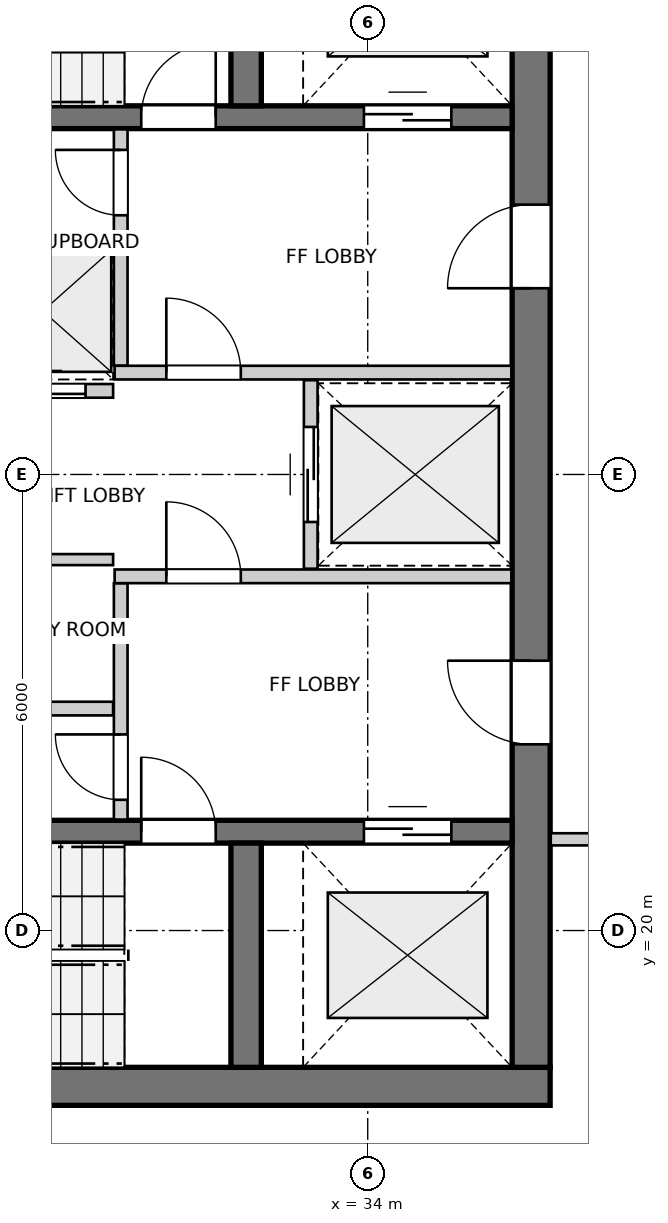
"""IFC4 building model, lengths in metres.
Left out: names, types, materials, properties, quantities, classifications, styles, units other than length and angle.
Written with IfcOpenShell. Run it as: python <this file> out.ifc"""

import sys

from ifc_helpers import new_model, si_unit, direction, frame, frame_2d, origin, place, context, subcontext, project, spatial, rectangle, extrude, source, transform, mapped, element, fill, save


model = new_model("IFC4")
c1 = context("Model", 3, precision=1e-05, world=origin(), true_north=direction((0.0, 1.0)))
c2 = subcontext(c1, "Body", "Model", "MODEL_VIEW")
j1 = project(units=[si_unit("LENGTHUNIT", "METRE"), si_unit("PLANEANGLEUNIT", "RADIAN")], contexts=[c1])
p1 = place(None, origin())
s1 = spatial("IfcSite", under=j1, at=p1, CompositionType="ELEMENT")
p2 = place(p1, origin())
s2 = spatial("IfcBuilding", under=s1, at=p2, CompositionType="ELEMENT")
p3 = place(p2, frame((0.0, 0.0, 234.0)))
s3 = spatial("IfcBuildingStorey", under=s2, at=p3, CompositionType="ELEMENT", Elevation=234.0)
p4 = place(p3, frame((24.3, 17.95, 0.0), z_axis=(0.0, 0.0, 1.0), x_axis=(1.0, 0.0, 0.0)))
e1 = element("IfcWall", 1, at=p4, inside=s3, PredefinedType="SHEAR", context=c2, shape_type="SweptSolid", body=[
    extrude(rectangle(XDim=12.1, YDim=0.5, at=frame_2d((6.05, 0.0))), origin(), (0.0, 0.0, 1.0), 2.96),
])
p5 = place(p3, frame((36.15, 18.2, 0.0), z_axis=(0.0, 0.0, 1.0), x_axis=(0.0, 1.0, 0.0)))
e2 = element("IfcWall", 2, at=p5, inside=s3, PredefinedType="SHEAR", context=c2, shape_type="SweptSolid", body=[
    extrude(rectangle(XDim=15.6, YDim=0.5, at=frame_2d((7.8, 0.0))), origin(), (0.0, 0.0, 1.0), 2.96),
])
p6 = place(p5, frame((4.25, 0.0, 0.0)))
e3 = element("IfcOpeningElement", 3, at=p6, cuts=e2, PredefinedType="OPENING", context=c2, shape_type="SweptSolid", body=[
    extrude(rectangle(XDim=1.1, YDim=2.15, at=frame_2d((0.55, 1.075))), frame((0.0, 0.26, 0.0), z_axis=(0.0, -1.0, 0.0), x_axis=(1.0, 0.0, 0.0)), (0.0, 0.0, 1.0), 0.52),
])
p7 = place(p5, frame((10.25, 0.0, 0.0)))
e4 = element("IfcOpeningElement", 4, at=p7, cuts=e2, PredefinedType="OPENING", context=c2, shape_type="SweptSolid", body=[
    extrude(rectangle(XDim=1.1, YDim=2.15, at=frame_2d((0.55, 1.075))), frame((0.0, 0.26, 0.0), z_axis=(0.0, -1.0, 0.0), x_axis=(1.0, 0.0, 0.0)), (0.0, 0.0, 1.0), 0.52),
])
p8 = place(p3, frame((24.8, 21.3, 0.0), z_axis=(0.0, 0.0, 1.0), x_axis=(1.0, 0.0, 0.0)))
e5 = element("IfcWall", 5, at=p8, inside=s3, PredefinedType="SHEAR", context=c2, shape_type="SweptSolid", body=[
    extrude(rectangle(XDim=11.1, YDim=0.3, at=frame_2d((5.55, 0.0))), origin(), (0.0, 0.0, 1.0), 2.96),
])
p9 = place(p8, frame((6.22, 0.0, 0.0)))
e6 = element("IfcOpeningElement", 6, at=p9, cuts=e5, PredefinedType="OPENING", context=c2, shape_type="SweptSolid", body=[
    extrude(rectangle(XDim=0.98, YDim=2.15, at=frame_2d((0.49, 1.075))), frame((0.0, 0.16, 0.0), z_axis=(0.0, -1.0, 0.0), x_axis=(1.0, 0.0, 0.0)), (0.0, 0.0, 1.0), 0.32),
])
p10 = place(p8, frame((9.15, 0.0, 0.0)))
e7 = element("IfcOpeningElement", 7, at=p10, cuts=e5, PredefinedType="OPENING", context=c2, shape_type="SweptSolid", body=[
    extrude(rectangle(XDim=1.15, YDim=2.15, at=frame_2d((0.575, 1.075))), frame((0.0, 0.16, 0.0), z_axis=(0.0, -1.0, 0.0), x_axis=(1.0, 0.0, 0.0)), (0.0, 0.0, 1.0), 0.32),
])
p11 = place(p3, frame((32.4, 18.2, 0.0), z_axis=(0.0, 0.0, 1.0), x_axis=(0.0, 1.0, 0.0)))
e8 = element("IfcWall", 8, at=p11, inside=s3, PredefinedType="SHEAR", context=c2, shape_type="SweptSolid", body=[
    extrude(rectangle(XDim=2.95, YDim=0.4, at=frame_2d((1.475, 0.0))), origin(), (0.0, 0.0, 1.0), 2.96),
])
p12 = place(p3, frame((24.8, 30.7, 0.0), z_axis=(0.0, 0.0, 1.0), x_axis=(1.0, 0.0, 0.0)))
e9 = element("IfcWall", 9, at=p12, inside=s3, PredefinedType="SHEAR", context=c2, shape_type="SweptSolid", body=[
    extrude(rectangle(XDim=11.1, YDim=0.3, at=frame_2d((5.55, 0.0))), origin(), (0.0, 0.0, 1.0), 2.96),
])
p13 = place(p12, frame((6.22, 0.0, 0.0)))
e10 = element("IfcOpeningElement", 10, at=p13, cuts=e9, PredefinedType="OPENING", context=c2, shape_type="SweptSolid", body=[
    extrude(rectangle(XDim=0.98, YDim=2.15, at=frame_2d((0.49, 1.075))), frame((0.0, 0.16, 0.0), z_axis=(0.0, -1.0, 0.0), x_axis=(1.0, 0.0, 0.0)), (0.0, 0.0, 1.0), 0.32),
])
p14 = place(p12, frame((9.15, 0.0, 0.0)))
e11 = element("IfcOpeningElement", 11, at=p14, cuts=e9, PredefinedType="OPENING", context=c2, shape_type="SweptSolid", body=[
    extrude(rectangle(XDim=1.15, YDim=2.15, at=frame_2d((0.575, 1.075))), frame((0.0, 0.16, 0.0), z_axis=(0.0, -1.0, 0.0), x_axis=(1.0, 0.0, 0.0)), (0.0, 0.0, 1.0), 0.32),
])
p15 = place(p3, frame((32.4, 30.85, 0.0), z_axis=(0.0, 0.0, 1.0), x_axis=(0.0, 1.0, 0.0)))
e12 = element("IfcWall", 12, at=p15, inside=s3, PredefinedType="SHEAR", context=c2, shape_type="SweptSolid", body=[
    extrude(rectangle(XDim=2.95, YDim=0.4, at=frame_2d((1.475, 0.0))), origin(), (0.0, 0.0, 1.0), 2.96),
])
p16 = place(p3, frame((30.75, 21.46, 0.0), z_axis=(0.0, 0.0, 1.0), x_axis=(0.0, 1.0, 0.0)))
e13 = element("IfcWall", 13, at=p16, inside=s3, PredefinedType="PARTITIONING", context=c2, shape_type="SweptSolid", body=[
    extrude(rectangle(XDim=3.11, YDim=0.18, at=frame_2d((1.555, 0.0))), origin(), (0.0, 0.0, 1.0), 2.96),
])
p17 = place(p16, frame((0.26, 0.0, 0.0)))
e14 = element("IfcOpeningElement", 14, at=p17, cuts=e13, PredefinedType="OPENING", context=c2, shape_type="SweptSolid", body=[
    extrude(rectangle(XDim=0.86, YDim=2.05, at=frame_2d((0.43, 1.025))), frame((0.0, 0.1, 0.0), z_axis=(0.0, -1.0, 0.0), x_axis=(1.0, 0.0, 0.0)), (0.0, 0.0, 1.0), 0.2),
])
p18 = place(p3, frame((30.67, 24.66, 0.0), z_axis=(0.0, 0.0, 1.0), x_axis=(1.0, 0.0, 0.0)))
e15 = element("IfcWall", 15, at=p18, inside=s3, PredefinedType="PARTITIONING", context=c2, shape_type="SweptSolid", body=[
    extrude(rectangle(XDim=5.22, YDim=0.18, at=frame_2d((2.61, 0.0))), origin(), (0.0, 0.0, 1.0), 2.96),
])
p19 = place(p18, frame((0.68, 0.0, 0.0)))
e16 = element("IfcOpeningElement", 16, at=p19, cuts=e15, PredefinedType="OPENING", context=c2, shape_type="SweptSolid", body=[
    extrude(rectangle(XDim=0.98, YDim=2.15, at=frame_2d((0.49, 1.075))), frame((0.0, 0.1, 0.0), z_axis=(0.0, -1.0, 0.0), x_axis=(1.0, 0.0, 0.0)), (0.0, 0.0, 1.0), 0.2),
])
p20 = place(p3, frame((30.75, 27.43, 0.0), z_axis=(0.0, 0.0, 1.0), x_axis=(0.0, 1.0, 0.0)))
e17 = element("IfcWall", 17, at=p20, inside=s3, PredefinedType="PARTITIONING", context=c2, shape_type="SweptSolid", body=[
    extrude(rectangle(XDim=3.11, YDim=0.18, at=frame_2d((1.555, 0.0))), origin(), (0.0, 0.0, 1.0), 2.96),
])
p21 = place(p20, frame((1.98, 0.0, 0.0)))
e18 = element("IfcOpeningElement", 18, at=p21, cuts=e17, PredefinedType="OPENING", context=c2, shape_type="SweptSolid", body=[
    extrude(rectangle(XDim=0.86, YDim=2.05, at=frame_2d((0.43, 1.025))), frame((0.0, 0.1, 0.0), z_axis=(0.0, -1.0, 0.0), x_axis=(1.0, 0.0, 0.0)), (0.0, 0.0, 1.0), 0.2),
])
p22 = place(p3, frame((30.67, 27.34, 0.0), z_axis=(0.0, 0.0, 1.0), x_axis=(1.0, 0.0, 0.0)))
e19 = element("IfcWall", 19, at=p22, inside=s3, PredefinedType="PARTITIONING", context=c2, shape_type="SweptSolid", body=[
    extrude(rectangle(XDim=5.22, YDim=0.18, at=frame_2d((2.61, 0.0))), origin(), (0.0, 0.0, 1.0), 2.96),
])
p23 = place(p22, frame((0.68, 0.0, 0.0)))
e20 = element("IfcOpeningElement", 20, at=p23, cuts=e19, PredefinedType="OPENING", context=c2, shape_type="SweptSolid", body=[
    extrude(rectangle(XDim=0.98, YDim=2.15, at=frame_2d((0.49, 1.075))), frame((0.0, 0.1, 0.0), z_axis=(0.0, -1.0, 0.0), x_axis=(1.0, 0.0, 0.0)), (0.0, 0.0, 1.0), 0.2),
])
p24 = place(p3, frame((33.25, 24.76, 0.0), z_axis=(0.0, 0.0, 1.0), x_axis=(0.0, 1.0, 0.0)))
e21 = element("IfcWall", 21, at=p24, inside=s3, PredefinedType="PARTITIONING", context=c2, shape_type="SweptSolid", body=[
    extrude(rectangle(XDim=2.48, YDim=0.18, at=frame_2d((1.24, 0.0))), origin(), (0.0, 0.0, 1.0), 2.96),
])
p25 = place(p24, frame((0.615, 0.0, 0.0)))
e22 = element("IfcOpeningElement", 22, at=p25, cuts=e21, PredefinedType="OPENING", context=c2, shape_type="SweptSolid", body=[
    extrude(rectangle(XDim=1.25, YDim=2.15, at=frame_2d((0.625, 1.075))), frame((0.0, 0.1, 0.0), z_axis=(0.0, -1.0, 0.0), x_axis=(1.0, 0.0, 0.0)), (0.0, 0.0, 1.0), 0.2),
])
p26 = place(p3, frame((24.81, 22.92, 0.0), z_axis=(0.0, 0.0, 1.0), x_axis=(1.0, 0.0, 0.0)))
e23 = element("IfcWall", 23, at=p26, inside=s3, PredefinedType="PARTITIONING", context=c2, shape_type="SweptSolid", body=[
    extrude(rectangle(XDim=5.84, YDim=0.18, at=frame_2d((2.92, 0.0))), origin(), (0.0, 0.0, 1.0), 2.96),
])
p27 = place(p3, frame((24.81, 24.88, 0.0), z_axis=(0.0, 0.0, 1.0), x_axis=(1.0, 0.0, 0.0)))
e24 = element("IfcWall", 24, at=p27, inside=s3, PredefinedType="PARTITIONING", context=c2, shape_type="SweptSolid", body=[
    extrude(rectangle(XDim=5.84, YDim=0.145, at=frame_2d((2.92, 0.0))), origin(), (0.0, 0.0, 1.0), 2.96),
])
p28 = place(p27, frame((2.4, 0.0, 0.0)))
e25 = element("IfcOpeningElement", 25, at=p28, cuts=e24, PredefinedType="OPENING", context=c2, shape_type="SweptSolid", body=[
    extrude(rectangle(XDim=0.96, YDim=2.1, at=frame_2d((0.48, 1.05))), frame((0.0, 0.083, 0.0), z_axis=(0.0, -1.0, 0.0), x_axis=(1.0, 0.0, 0.0)), (0.0, 0.0, 1.0), 0.165),
])
p29 = place(p3, frame((24.81, 29.08, 0.0), z_axis=(0.0, 0.0, 1.0), x_axis=(1.0, 0.0, 0.0)))
e26 = element("IfcWall", 26, at=p29, inside=s3, PredefinedType="PARTITIONING", context=c2, shape_type="SweptSolid", body=[
    extrude(rectangle(XDim=5.84, YDim=0.18, at=frame_2d((2.92, 0.0))), origin(), (0.0, 0.0, 1.0), 2.96),
])
p30 = place(p3, frame((28.825, 27.1, 0.0), z_axis=(0.0, 0.0, 1.0), x_axis=(1.0, 0.0, 0.0)))
e27 = element("IfcWall", 27, at=p30, inside=s3, PredefinedType="PARTITIONING", context=c2, shape_type="SweptSolid", body=[
    extrude(rectangle(XDim=1.825, YDim=0.18, at=frame_2d((0.913, 0.0))), origin(), (0.0, 0.0, 1.0), 2.96),
])
p31 = place(p30, frame((0.363, 0.0, 0.0)))
e28 = element("IfcOpeningElement", 28, at=p31, cuts=e27, PredefinedType="OPENING", context=c2, shape_type="SweptSolid", body=[
    extrude(rectangle(XDim=1.1, YDim=2.15, at=frame_2d((0.55, 1.075))), frame((0.0, 0.1, 0.0), z_axis=(0.0, -1.0, 0.0), x_axis=(1.0, 0.0, 0.0)), (0.0, 0.0, 1.0), 0.2),
])
p32 = place(p3, frame((36.408, 21.2, 0.0), z_axis=(0.0, 0.0, 1.0), x_axis=(1.0, 0.0, 0.0)))
e29 = element("IfcWall", 29, at=p32, inside=s3, PredefinedType="PARTITIONING", context=c2, shape_type="SweptSolid", body=[
    extrude(rectangle(XDim=1.061, YDim=0.16, at=frame_2d((0.531, 0.0))), origin(), (0.0, 0.0, 1.0), 2.96),
])
m1 = source(origin(), c2, "Body", "SweptSolid", [
    extrude(rectangle(XDim=0.98, YDim=2.15, at=frame_2d((0.49, 1.075))), frame((0.0, 0.025, 0.0), z_axis=(0.0, -1.0, 0.0), x_axis=(1.0, 0.0, 0.0)), (0.0, 0.0, 1.0), 0.05),
])
p33 = place(p9, origin())
e30 = element("IfcDoor", 30, at=p33, inside=s3, OperationType="SINGLE_SWING_LEFT", PredefinedType="DOOR", context=c2, shape_type="MappedRepresentation", body=[
    mapped(m1, transform((0.0, 0.0, 0.0), x_axis=(1.0, 0.0, 0.0), y_axis=(0.0, 1.0, 0.0), z_axis=(0.0, 0.0, 1.0), scale=1.0)),
])
fill(e6, e30)
m2 = source(origin(), c2, "Body", "SweptSolid", [
    extrude(rectangle(XDim=1.15, YDim=2.15, at=frame_2d((0.575, 1.075))), frame((0.0, 0.025, 0.0), z_axis=(0.0, -1.0, 0.0), x_axis=(1.0, 0.0, 0.0)), (0.0, 0.0, 1.0), 0.05),
])
p34 = place(p10, origin())
e31 = element("IfcDoor", 31, at=p34, inside=s3, OperationType="DOUBLE_DOOR_SLIDING", PredefinedType="DOOR", context=c2, shape_type="MappedRepresentation", body=[
    mapped(m2, transform((0.0, 0.0, 0.0), x_axis=(1.0, 0.0, 0.0), y_axis=(0.0, 1.0, 0.0), z_axis=(0.0, 0.0, 1.0), scale=1.0)),
])
fill(e7, e31)
p35 = place(p13, origin())
e32 = element("IfcDoor", 32, at=p35, inside=s3, OperationType="SINGLE_SWING_RIGHT", PredefinedType="DOOR", context=c2, shape_type="MappedRepresentation", body=[
    mapped(m1, transform((0.0, 0.0, 0.0), x_axis=(1.0, 0.0, 0.0), y_axis=(0.0, 1.0, 0.0), z_axis=(0.0, 0.0, 1.0), scale=1.0)),
])
fill(e10, e32)
p36 = place(p14, origin())
e33 = element("IfcDoor", 33, at=p36, inside=s3, OperationType="DOUBLE_DOOR_SLIDING", PredefinedType="DOOR", context=c2, shape_type="MappedRepresentation", body=[
    mapped(m2, transform((0.0, 0.0, 0.0), x_axis=(1.0, 0.0, 0.0), y_axis=(0.0, 1.0, 0.0), z_axis=(0.0, 0.0, 1.0), scale=1.0)),
])
fill(e11, e33)
m3 = source(origin(), c2, "Body", "SweptSolid", [
    extrude(rectangle(XDim=1.1, YDim=2.15, at=frame_2d((0.55, 1.075))), frame((0.0, 0.025, 0.0), z_axis=(0.0, -1.0, 0.0), x_axis=(1.0, 0.0, 0.0)), (0.0, 0.0, 1.0), 0.05),
])
p37 = place(p6, origin())
e34 = element("IfcDoor", 34, at=p37, inside=s3, OperationType="SINGLE_SWING_RIGHT", PredefinedType="DOOR", context=c2, shape_type="MappedRepresentation", body=[
    mapped(m3, transform((0.0, 0.0, 0.0), x_axis=(1.0, 0.0, 0.0), y_axis=(0.0, 1.0, 0.0), z_axis=(0.0, 0.0, 1.0), scale=1.0)),
])
fill(e3, e34)
p38 = place(p7, origin())
e35 = element("IfcDoor", 35, at=p38, inside=s3, OperationType="SINGLE_SWING_LEFT", PredefinedType="DOOR", context=c2, shape_type="MappedRepresentation", body=[
    mapped(m3, transform((0.0, 0.0, 0.0), x_axis=(1.0, 0.0, 0.0), y_axis=(0.0, 1.0, 0.0), z_axis=(0.0, 0.0, 1.0), scale=1.0)),
])
fill(e4, e35)
m4 = source(origin(), c2, "Body", "SweptSolid", [
    extrude(rectangle(XDim=0.86, YDim=2.05, at=frame_2d((0.43, 1.025))), frame((0.0, 0.025, 0.0), z_axis=(0.0, -1.0, 0.0), x_axis=(1.0, 0.0, 0.0)), (0.0, 0.0, 1.0), 0.05),
])
p39 = place(p17, origin())
e36 = element("IfcDoor", 36, at=p39, inside=s3, OperationType="SINGLE_SWING_RIGHT", PredefinedType="DOOR", context=c2, shape_type="MappedRepresentation", body=[
    mapped(m4, transform((0.0, 0.0, 0.0), x_axis=(1.0, 0.0, 0.0), y_axis=(0.0, 1.0, 0.0), z_axis=(0.0, 0.0, 1.0), scale=1.0)),
])
fill(e14, e36)
p40 = place(p19, origin())
e37 = element("IfcDoor", 37, at=p40, inside=s3, OperationType="SINGLE_SWING_LEFT", PredefinedType="DOOR", context=c2, shape_type="MappedRepresentation", body=[
    mapped(m1, transform((0.0, 0.0, 0.0), x_axis=(1.0, 0.0, 0.0), y_axis=(0.0, 1.0, 0.0), z_axis=(0.0, 0.0, 1.0), scale=1.0)),
])
fill(e16, e37)
p41 = place(p21, origin())
e38 = element("IfcDoor", 38, at=p41, inside=s3, OperationType="SINGLE_SWING_RIGHT", PredefinedType="DOOR", context=c2, shape_type="MappedRepresentation", body=[
    mapped(m4, transform((0.0, 0.0, 0.0), x_axis=(1.0, 0.0, 0.0), y_axis=(0.0, 1.0, 0.0), z_axis=(0.0, 0.0, 1.0), scale=1.0)),
])
fill(e18, e38)
p42 = place(p23, origin())
e39 = element("IfcDoor", 39, at=p42, inside=s3, OperationType="SINGLE_SWING_LEFT", PredefinedType="DOOR", context=c2, shape_type="MappedRepresentation", body=[
    mapped(m1, transform((0.0, 0.0, 0.0), x_axis=(1.0, 0.0, 0.0), y_axis=(0.0, 1.0, 0.0), z_axis=(0.0, 0.0, 1.0), scale=1.0)),
])
fill(e20, e39)
m5 = source(origin(), c2, "Body", "SweptSolid", [
    extrude(rectangle(XDim=1.25, YDim=2.15, at=frame_2d((0.625, 1.075))), frame((0.0, 0.025, 0.0), z_axis=(0.0, -1.0, 0.0), x_axis=(1.0, 0.0, 0.0)), (0.0, 0.0, 1.0), 0.05),
])
p43 = place(p25, origin())
e40 = element("IfcDoor", 40, at=p43, inside=s3, OperationType="DOUBLE_DOOR_SLIDING", PredefinedType="DOOR", context=c2, shape_type="MappedRepresentation", body=[
    mapped(m5, transform((0.0, 0.0, 0.0), x_axis=(1.0, 0.0, 0.0), y_axis=(0.0, 1.0, 0.0), z_axis=(0.0, 0.0, 1.0), scale=1.0)),
])
fill(e22, e40)
p44 = place(p31, origin())
e41 = element("IfcDoor", 41, at=p44, inside=s3, OperationType="DOUBLE_DOOR_SLIDING", PredefinedType="DOOR", context=c2, shape_type="MappedRepresentation", body=[
    mapped(m3, transform((0.0, 0.0, 0.0), x_axis=(1.0, 0.0, 0.0), y_axis=(0.0, 1.0, 0.0), z_axis=(0.0, 0.0, 1.0), scale=1.0)),
])
fill(e28, e41)
save(model, sys.argv[1])
